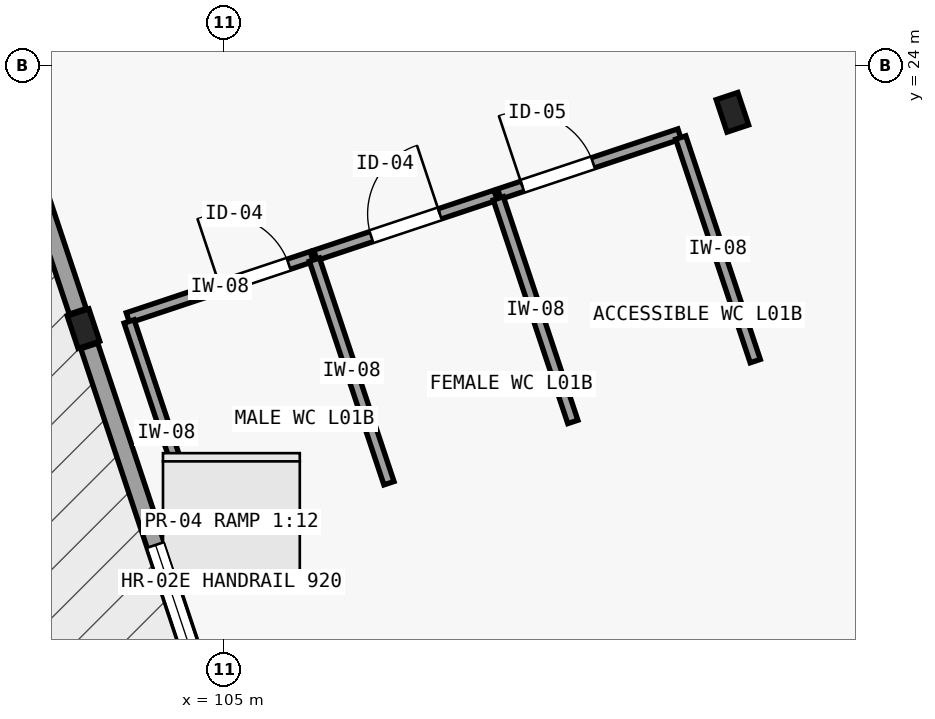
"""IFC4 building model, lengths in metres.
Left out: names, types, materials, properties, quantities, classifications, styles, units other than length and angle.
Written with IfcOpenShell. Run it as: python <this file> out.ifc"""

import sys

from ifc_helpers import new_model, si_unit, direction, frame, frame_2d, origin, origin_2d, place, context, subcontext, project, spatial, rectangle, i_section, extrude, element, fill, save


model = new_model("IFC4")
c1 = context("Model", 3, precision=1e-05, world=origin(), true_north=direction((0.0, 1.0)))
c2 = subcontext(c1, "Body", "Model", "MODEL_VIEW")
j1 = project(units=[si_unit("LENGTHUNIT", "METRE"), si_unit("PLANEANGLEUNIT", "RADIAN")], contexts=[c1])
p1 = place(None, origin())
s1 = spatial("IfcSite", under=j1, at=p1, CompositionType="ELEMENT")
p2 = place(p1, origin())
s2 = spatial("IfcBuilding", under=s1, at=p2, CompositionType="ELEMENT")
p3 = place(p2, origin())
s3 = spatial("IfcBuildingStorey", under=s2, at=p3, CompositionType="ELEMENT", Elevation=0.0)
for number, where, z_axis, x_axis in (
    (1, (103.154, 20.538, 0.0), (0.0, 0.0, 1.0), (0.949, 0.316, 0.0)),
    (2, (111.692, 23.384, 0.0), (0.0, 0.0, 1.0), (0.949, 0.316, 0.0)),
):
    element("IfcColumn", number, at=place(p3, frame(where, z_axis=z_axis, x_axis=x_axis)), inside=s3, PredefinedType="COLUMN", context=c2, shape_type="SweptSolid", body=[
        extrude(i_section(OverallWidth=0.3, OverallDepth=0.45, WebThickness=0.014, FlangeThickness=0.026, FilletRadius=0.027, at=origin_2d()), origin(), (0.0, 0.0, 1.0), 5.4),
    ])
p4 = place(p3, frame((105.924, 12.228, 0.0), z_axis=(0.0, 0.0, 1.0), x_axis=(-0.316236362498, 0.948680432514, 0.0)))
e3 = element("IfcWall", 3, at=p4, inside=s3, PredefinedType="SOLIDWALL", context=c2, shape_type="SweptSolid", body=[
    extrude(rectangle(XDim=8.52, YDim=0.235, at=frame_2d((4.26, 0.0))), origin(), (0.0, 0.0, 1.0), 4.75),
])
p5 = place(p4, frame((2.76, 0.0, 1.05)))
e4 = element("IfcOpeningElement", 4, at=p5, cuts=e3, PredefinedType="OPENING", context=c2, shape_type="SweptSolid", body=[
    extrude(rectangle(XDim=3.0, YDim=1.8, at=frame_2d((1.5, 0.9))), frame((0.0, 0.127, 0.0), z_axis=(0.0, -1.0, 0.0), x_axis=(1.0, 0.0, 0.0)), (0.0, 0.0, 1.0), 0.255),
])
p6 = place(p3, frame((103.078, 20.766, 0.0), z_axis=(0.0, 0.0, 1.0), x_axis=(-0.316236362498, 0.948680432514, 0.0)))
e5 = element("IfcWall", 5, at=p6, inside=s3, PredefinedType="SOLIDWALL", context=c2, shape_type="SweptSolid", body=[
    extrude(rectangle(XDim=8.52, YDim=0.235, at=frame_2d((4.26, 0.0))), origin(), (0.0, 0.0, 1.0), 4.75),
])
p7 = place(p6, frame((3.26, 0.0, 0.0)))
e6 = element("IfcOpeningElement", 6, at=p7, cuts=e5, PredefinedType="OPENING", context=c2, shape_type="SweptSolid", body=[
    extrude(rectangle(XDim=2.0, YDim=2.3, at=frame_2d((1.0, 1.15))), frame((0.0, 0.127, 0.0), z_axis=(0.0, -1.0, 0.0), x_axis=(1.0, 0.0, 0.0)), (0.0, 0.0, 1.0), 0.255),
])
p8 = place(p3, frame((103.739, 20.68, 0.0), z_axis=(0.0, 0.0, 1.0), x_axis=(0.948683298051, 0.316227766017, 0.0)))
e7 = element("IfcWall", 7, at=p8, inside=s3, PredefinedType="PARTITIONING", context=c2, shape_type="SweptSolid", body=[
    extrude(rectangle(XDim=2.55, YDim=0.14, at=frame_2d((1.275, 0.0))), origin(), (0.0, 0.0, 1.0), 4.65),
])
p9 = place(p8, frame((1.28, 0.0, 0.0)))
e8 = element("IfcOpeningElement", 8, at=p9, cuts=e7, PredefinedType="OPENING", context=c2, shape_type="SweptSolid", body=[
    extrude(rectangle(XDim=0.95, YDim=2.1, at=frame_2d((0.475, 1.05))), frame((0.0, 0.08, 0.0), z_axis=(0.0, -1.0, 0.0), x_axis=(1.0, 0.0, 0.0)), (0.0, 0.0, 1.0), 0.16),
])
p10 = place(p3, frame((106.206, 21.503, 0.0), z_axis=(0.0, 0.0, 1.0), x_axis=(0.948683298051, 0.316227766017, 0.0)))
e9 = element("IfcWall", 9, at=p10, inside=s3, PredefinedType="PARTITIONING", context=c2, shape_type="SweptSolid", body=[
    extrude(rectangle(XDim=2.5, YDim=0.14, at=frame_2d((1.25, 0.0))), origin(), (0.0, 0.0, 1.0), 4.65),
])
p11 = place(p10, frame((0.775, 0.0, 0.0)))
e10 = element("IfcOpeningElement", 10, at=p11, cuts=e9, PredefinedType="OPENING", context=c2, shape_type="SweptSolid", body=[
    extrude(rectangle(XDim=0.95, YDim=2.1, at=frame_2d((0.475, 1.05))), frame((0.0, 0.08, 0.0), z_axis=(0.0, -1.0, 0.0), x_axis=(1.0, 0.0, 0.0)), (0.0, 0.0, 1.0), 0.16),
])
p12 = place(p3, frame((108.625, 22.309, 0.0), z_axis=(0.0, 0.0, 1.0), x_axis=(0.948683298051, 0.316227766017, 0.0)))
e11 = element("IfcWall", 11, at=p12, inside=s3, PredefinedType="PARTITIONING", context=c2, shape_type="SweptSolid", body=[
    extrude(rectangle(XDim=2.5, YDim=0.14, at=frame_2d((1.25, 0.0))), origin(), (0.0, 0.0, 1.0), 4.65),
])
p13 = place(p12, frame((0.32, 0.0, 0.0)))
e12 = element("IfcOpeningElement", 12, at=p13, cuts=e11, PredefinedType="OPENING", context=c2, shape_type="SweptSolid", body=[
    extrude(rectangle(XDim=0.98, YDim=2.15, at=frame_2d((0.49, 1.075))), frame((0.0, 0.08, 0.0), z_axis=(0.0, -1.0, 0.0), x_axis=(1.0, 0.0, 0.0)), (0.0, 0.0, 1.0), 0.16),
])
for number, where, z_axis, x_axis in (
    (13, (107.173, 18.505, 0.0), (0.0, 0.0, 1.0), (-0.316, 0.949, 0.0)),
    (14, (109.592, 19.311, 0.0), (0.0, 0.0, 1.0), (-0.316, 0.949, 0.0)),
    (15, (104.735, 17.692, 0.0), (0.0, 0.0, 1.0), (-0.316, 0.949, 0.0)),
    (16, (111.992, 20.111, 0.0), (0.0, 0.0, 1.0), (-0.316, 0.949, 0.0)),
):
    element("IfcWall", number, at=place(p3, frame(where, z_axis=z_axis, x_axis=x_axis)), inside=s3, PredefinedType="PARTITIONING", context=c2, shape_type="SweptSolid", body=[
        extrude(rectangle(XDim=3.1, YDim=0.14, at=frame_2d((1.55, 0.0))), origin(), (0.0, 0.0, 1.0), 5.08),
    ])
p14 = place(p5, origin())
e17 = element("IfcWindow", 17, at=p14, inside=s3, PartitioningType="SINGLE_PANEL", PredefinedType="WINDOW", context=c2, shape_type="SweptSolid", body=[
    extrude(rectangle(XDim=3.0, YDim=1.8, at=frame_2d((1.5, 0.9))), frame((0.0, 0.03, 0.0), z_axis=(0.0, -1.0, 0.0), x_axis=(1.0, 0.0, 0.0)), (0.0, 0.0, 1.0), 0.06),
])
fill(e4, e17)
p15 = place(p9, origin())
e18 = element("IfcDoor", 18, at=p15, inside=s3, OperationType="SINGLE_SWING_LEFT", PredefinedType="DOOR", context=c2, shape_type="SweptSolid", body=[
    extrude(rectangle(XDim=0.95, YDim=2.1, at=frame_2d((0.475, 1.05))), frame((0.0, 0.025, 0.0), z_axis=(0.0, -1.0, 0.0), x_axis=(1.0, 0.0, 0.0)), (0.0, 0.0, 1.0), 0.05),
])
fill(e8, e18)
p16 = place(p11, origin())
e19 = element("IfcDoor", 19, at=p16, inside=s3, OperationType="SINGLE_SWING_RIGHT", PredefinedType="DOOR", context=c2, shape_type="SweptSolid", body=[
    extrude(rectangle(XDim=0.95, YDim=2.1, at=frame_2d((0.475, 1.05))), frame((0.0, 0.025, 0.0), z_axis=(0.0, -1.0, 0.0), x_axis=(1.0, 0.0, 0.0)), (0.0, 0.0, 1.0), 0.05),
])
fill(e10, e19)
p17 = place(p13, origin())
e20 = element("IfcDoor", 20, at=p17, inside=s3, OperationType="SINGLE_SWING_LEFT", PredefinedType="DOOR", context=c2, shape_type="SweptSolid", body=[
    extrude(rectangle(XDim=0.98, YDim=2.15, at=frame_2d((0.49, 1.075))), frame((0.0, 0.025, 0.0), z_axis=(0.0, -1.0, 0.0), x_axis=(1.0, 0.0, 0.0)), (0.0, 0.0, 1.0), 0.05),
])
fill(e12, e20)
save(model, sys.argv[1])
